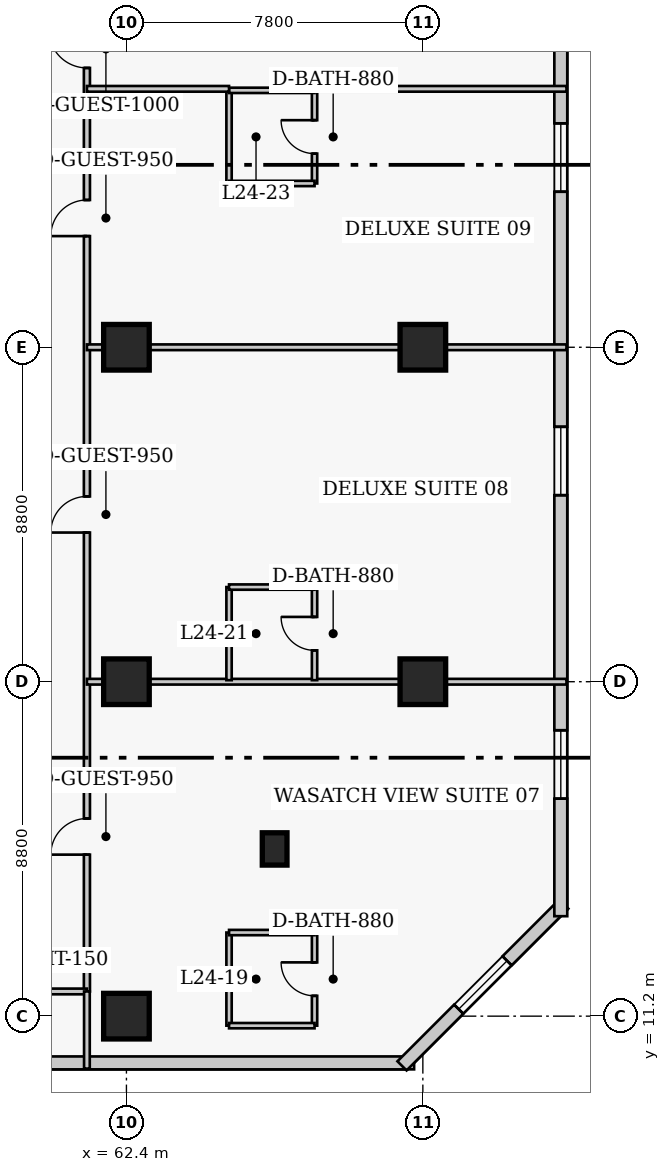
"""IFC4 building model, lengths in metres.
Left out: names, types, materials, properties, quantities, classifications, styles, units other than length and angle.
Written with IfcOpenShell. Run it as: python <this file> out.ifc"""

import sys

from ifc_helpers import new_model, si_unit, direction, frame, frame_2d, origin, origin_2d, place, context, subcontext, project, spatial, rectangle, extrude, element, fill, save


model = new_model("IFC4")
c1 = context("Model", 3, precision=1e-05, world=origin(), true_north=direction((0.0, 1.0)))
c2 = subcontext(c1, "Body", "Model", "MODEL_VIEW")
j1 = project(units=[si_unit("LENGTHUNIT", "METRE"), si_unit("PLANEANGLEUNIT", "RADIAN")], contexts=[c1])
p1 = place(None, origin())
s1 = spatial("IfcSite", under=j1, at=p1, CompositionType="ELEMENT")
p2 = place(p1, origin())
s2 = spatial("IfcBuilding", under=s1, at=p2, CompositionType="ELEMENT")
p3 = place(p2, frame((0.0, 0.0, 99.4)))
s3 = spatial("IfcBuildingStorey", under=s2, at=p3, CompositionType="ELEMENT", Elevation=99.4)
for number, where, z_axis, x_axis in (
    (1, (62.4, 11.2, 0.0), (0.0, 0.0, 1.0), (1.0, 0.0, 0.0)),
    (2, (62.4, 20.0, 0.0), (0.0, 0.0, 1.0), (1.0, 0.0, 0.0)),
    (3, (62.4, 28.8, 0.0), (0.0, 0.0, 1.0), (1.0, 0.0, 0.0)),
    (4, (70.2, 20.0, 0.0), (0.0, 0.0, 1.0), (1.0, 0.0, 0.0)),
    (5, (70.2, 28.8, 0.0), (0.0, 0.0, 1.0), (1.0, 0.0, 0.0)),
):
    element("IfcColumn", number, at=place(p3, frame(where, z_axis=z_axis, x_axis=x_axis)), inside=s3, PredefinedType="COLUMN", context=c2, shape_type="SweptSolid", body=[
        extrude(rectangle(XDim=1.2, YDim=1.2, at=origin_2d()), origin(), (0.0, 0.0, 1.0), 3.8),
    ])
p4 = place(p3, frame((66.3, 15.6, 0.0), z_axis=(0.0, 0.0, 1.0), x_axis=(1.0, 0.0, 0.0)))
e6 = element("IfcColumn", 6, at=p4, inside=s3, PredefinedType="PILASTER", context=c2, shape_type="SweptSolid", body=[
    extrude(rectangle(XDim=0.65, YDim=0.85, at=origin_2d()), origin(), (0.0, 0.0, 1.0), 3.8),
])
p5 = place(p3, frame((41.68, 9.97, 0.0), z_axis=(0.0, 0.0, 1.0), x_axis=(1.0, 0.0, 0.0)))
e7 = element("IfcWall", 7, at=p5, inside=s3, PredefinedType="SOLIDWALL", context=c2, shape_type="SweptSolid", body=[
    extrude(rectangle(XDim=28.29, YDim=0.34, at=frame_2d((14.145, 0.0))), origin(), (0.0, 0.0, 1.0), 3.54),
])
p6 = place(p5, frame((2.665, 0.0, 0.85)))
e8 = element("IfcOpeningElement", 8, at=p6, cuts=e7, PredefinedType="OPENING", context=c2, shape_type="SweptSolid", body=[
    extrude(rectangle(XDim=1.8, YDim=1.8, at=frame_2d((0.9, 0.9))), frame((0.0, 0.18, 0.0), z_axis=(0.0, -1.0, 0.0), x_axis=(1.0, 0.0, 0.0)), (0.0, 0.0, 1.0), 0.36),
])
p7 = place(p5, frame((13.895, 0.0, 0.85)))
e9 = element("IfcOpeningElement", 9, at=p7, cuts=e7, PredefinedType="OPENING", context=c2, shape_type="SweptSolid", body=[
    extrude(rectangle(XDim=1.8, YDim=1.8, at=frame_2d((0.9, 0.9))), frame((0.0, 0.18, 0.0), z_axis=(0.0, -1.0, 0.0), x_axis=(1.0, 0.0, 0.0)), (0.0, 0.0, 1.0), 0.36),
])
p8 = place(p3, frame((69.652, 9.892, 0.0), z_axis=(0.0, 0.0, 1.0), x_axis=(0.707106781187, 0.707106781187, 0.0)))
e10 = element("IfcWall", 10, at=p8, inside=s3, PredefinedType="SOLIDWALL", context=c2, shape_type="SweptSolid", body=[
    extrude(rectangle(XDim=6.02, YDim=0.34, at=frame_2d((3.01, 0.0))), origin(), (0.0, 0.0, 1.0), 3.54),
])
p9 = place(p8, frame((2.11, 0.0, 0.85)))
e11 = element("IfcOpeningElement", 11, at=p9, cuts=e10, PredefinedType="OPENING", context=c2, shape_type="SweptSolid", body=[
    extrude(rectangle(XDim=1.8, YDim=1.8, at=frame_2d((0.9, 0.9))), frame((0.0, 0.18, 0.0), z_axis=(0.0, -1.0, 0.0), x_axis=(1.0, 0.0, 0.0)), (0.0, 0.0, 1.0), 0.36),
])
p10 = place(p3, frame((73.83, 13.83, 0.0), z_axis=(0.0, 0.0, 1.0), x_axis=(0.0, 1.0, 0.0)))
e12 = element("IfcWall", 12, at=p10, inside=s3, PredefinedType="SOLIDWALL", context=c2, shape_type="SweptSolid", body=[
    extrude(rectangle(XDim=31.94, YDim=0.34, at=frame_2d((15.97, 0.0))), origin(), (0.0, 0.0, 1.0), 3.54),
])
p11 = place(p10, frame((3.093, 0.0, 0.85)))
e13 = element("IfcOpeningElement", 13, at=p11, cuts=e12, PredefinedType="OPENING", context=c2, shape_type="SweptSolid", body=[
    extrude(rectangle(XDim=1.8, YDim=1.8, at=frame_2d((0.9, 0.9))), frame((0.0, 0.18, 0.0), z_axis=(0.0, -1.0, 0.0), x_axis=(1.0, 0.0, 0.0)), (0.0, 0.0, 1.0), 0.36),
])
p12 = place(p10, frame((11.077, 0.0, 0.85)))
e14 = element("IfcOpeningElement", 14, at=p12, cuts=e12, PredefinedType="OPENING", context=c2, shape_type="SweptSolid", body=[
    extrude(rectangle(XDim=1.8, YDim=1.8, at=frame_2d((0.9, 0.9))), frame((0.0, 0.18, 0.0), z_axis=(0.0, -1.0, 0.0), x_axis=(1.0, 0.0, 0.0)), (0.0, 0.0, 1.0), 0.36),
])
p13 = place(p10, frame((19.062, 0.0, 0.85)))
e15 = element("IfcOpeningElement", 15, at=p13, cuts=e12, PredefinedType="OPENING", context=c2, shape_type="SweptSolid", body=[
    extrude(rectangle(XDim=1.8, YDim=1.8, at=frame_2d((0.9, 0.9))), frame((0.0, 0.18, 0.0), z_axis=(0.0, -1.0, 0.0), x_axis=(1.0, 0.0, 0.0)), (0.0, 0.0, 1.0), 0.36),
])
p14 = place(p10, frame((27.048, 0.0, 0.85)))
e16 = element("IfcOpeningElement", 16, at=p14, cuts=e12, PredefinedType="OPENING", context=c2, shape_type="SweptSolid", body=[
    extrude(rectangle(XDim=1.8, YDim=1.8, at=frame_2d((0.9, 0.9))), frame((0.0, 0.18, 0.0), z_axis=(0.0, -1.0, 0.0), x_axis=(1.0, 0.0, 0.0)), (0.0, 0.0, 1.0), 0.36),
])
p15 = place(p3, frame((61.36, 11.85, 0.0), z_axis=(0.0, 0.0, 1.0), x_axis=(0.0, 1.0, 0.0)))
e17 = element("IfcWall", 17, at=p15, inside=s3, PredefinedType="PARTITIONING", context=c2, shape_type="SweptSolid", body=[
    extrude(rectangle(XDim=28.8, YDim=0.16, at=frame_2d((14.4, 0.0))), origin(), (0.0, 0.0, 1.0), 3.54),
])
p16 = place(p15, frame((3.6, 0.0, 0.0)))
e18 = element("IfcOpeningElement", 18, at=p16, cuts=e17, PredefinedType="OPENING", context=c2, shape_type="SweptSolid", body=[
    extrude(rectangle(XDim=0.95, YDim=2.1, at=frame_2d((0.475, 1.05))), frame((0.0, 0.09, 0.0), z_axis=(0.0, -1.0, 0.0), x_axis=(1.0, 0.0, 0.0)), (0.0, 0.0, 1.0), 0.18),
])
p17 = place(p15, frame((12.075, 0.0, 0.0)))
e19 = element("IfcOpeningElement", 19, at=p17, cuts=e17, PredefinedType="OPENING", context=c2, shape_type="SweptSolid", body=[
    extrude(rectangle(XDim=0.95, YDim=2.1, at=frame_2d((0.475, 1.05))), frame((0.0, 0.09, 0.0), z_axis=(0.0, -1.0, 0.0), x_axis=(1.0, 0.0, 0.0)), (0.0, 0.0, 1.0), 0.18),
])
p18 = place(p15, frame((19.875, 0.0, 0.0)))
e20 = element("IfcOpeningElement", 20, at=p18, cuts=e17, PredefinedType="OPENING", context=c2, shape_type="SweptSolid", body=[
    extrude(rectangle(XDim=0.95, YDim=2.1, at=frame_2d((0.475, 1.05))), frame((0.0, 0.09, 0.0), z_axis=(0.0, -1.0, 0.0), x_axis=(1.0, 0.0, 0.0)), (0.0, 0.0, 1.0), 0.18),
])
p19 = place(p15, frame((24.3, 0.0, 0.0)))
e21 = element("IfcOpeningElement", 21, at=p19, cuts=e17, PredefinedType="OPENING", context=c2, shape_type="SweptSolid", body=[
    extrude(rectangle(XDim=1.0, YDim=2.15, at=frame_2d((0.5, 1.075))), frame((0.0, 0.09, 0.0), z_axis=(0.0, -1.0, 0.0), x_axis=(1.0, 0.0, 0.0)), (0.0, 0.0, 1.0), 0.18),
])
p20 = place(p3, frame((59.14, 11.85, 0.0), z_axis=(0.0, 0.0, 1.0), x_axis=(1.0, 0.0, 0.0)))
e22 = element("IfcWall", 22, at=p20, inside=s3, PredefinedType="PARTITIONING", context=c2, shape_type="SweptSolid", body=[
    extrude(rectangle(XDim=2.22, YDim=0.15, at=frame_2d((1.11, 0.0))), origin(), (0.0, 0.0, 1.0), 3.54),
])
p21 = place(p3, frame((61.36, 9.82, 0.0), z_axis=(0.0, 0.0, 1.0), x_axis=(0.0, 1.0, 0.0)))
e23 = element("IfcWall", 23, at=p21, inside=s3, PredefinedType="PARTITIONING", context=c2, shape_type="SweptSolid", body=[
    extrude(rectangle(XDim=2.03, YDim=0.15, at=frame_2d((1.015, 0.0))), origin(), (0.0, 0.0, 1.0), 3.54),
])
p22 = place(p3, frame((65.1, 10.95, 0.0), z_axis=(0.0, 0.0, 1.0), x_axis=(0.0, 1.0, 0.0)))
e24 = element("IfcWall", 24, at=p22, inside=s3, PredefinedType="PLUMBINGWALL", context=c2, shape_type="SweptSolid", body=[
    extrude(rectangle(XDim=2.45, YDim=0.14, at=frame_2d((1.225, 0.0))), origin(), (0.0, 0.0, 1.0), 3.54),
])
p23 = place(p3, frame((67.35, 10.95, 0.0), z_axis=(0.0, 0.0, 1.0), x_axis=(0.0, 1.0, 0.0)))
e25 = element("IfcWall", 25, at=p23, inside=s3, PredefinedType="PLUMBINGWALL", context=c2, shape_type="SweptSolid", body=[
    extrude(rectangle(XDim=2.45, YDim=0.14, at=frame_2d((1.225, 0.0))), origin(), (0.0, 0.0, 1.0), 3.54),
])
p24 = place(p23, frame((0.785, 0.0, 0.0)))
e26 = element("IfcOpeningElement", 26, at=p24, cuts=e25, PredefinedType="OPENING", context=c2, shape_type="SweptSolid", body=[
    extrude(rectangle(XDim=0.88, YDim=2.05, at=frame_2d((0.44, 1.025))), frame((0.0, 0.08, 0.0), z_axis=(0.0, -1.0, 0.0), x_axis=(1.0, 0.0, 0.0)), (0.0, 0.0, 1.0), 0.16),
])
for number, where, z_axis, x_axis in (
    (27, (65.1, 10.95, 0.0), (0.0, 0.0, 1.0), (1.0, 0.0, 0.0)),
    (28, (65.1, 13.4, 0.0), (0.0, 0.0, 1.0), (1.0, 0.0, 0.0)),
):
    element("IfcWall", number, at=place(p3, frame(where, z_axis=z_axis, x_axis=x_axis)), inside=s3, PredefinedType="PLUMBINGWALL", context=c2, shape_type="SweptSolid", body=[
        extrude(rectangle(XDim=2.25, YDim=0.14, at=frame_2d((1.125, 0.0))), origin(), (0.0, 0.0, 1.0), 3.54),
    ])
p25 = place(p3, frame((61.36, 20.0, 0.0), z_axis=(0.0, 0.0, 1.0), x_axis=(1.0, 0.0, 0.0)))
e29 = element("IfcWall", 29, at=p25, inside=s3, PredefinedType="PARTITIONING", context=c2, shape_type="SweptSolid", body=[
    extrude(rectangle(XDim=12.62, YDim=0.15, at=frame_2d((6.31, 0.0))), origin(), (0.0, 0.0, 1.0), 2.679),
])
p26 = place(p3, frame((65.1, 20.04, 0.0), z_axis=(0.0, 0.0, 1.0), x_axis=(0.0, 1.0, 0.0)))
e30 = element("IfcWall", 30, at=p26, inside=s3, PredefinedType="PLUMBINGWALL", context=c2, shape_type="SweptSolid", body=[
    extrude(rectangle(XDim=2.45, YDim=0.14, at=frame_2d((1.225, 0.0))), origin(), (0.0, 0.0, 1.0), 3.54),
])
p27 = place(p3, frame((67.35, 20.04, 0.0), z_axis=(0.0, 0.0, 1.0), x_axis=(0.0, 1.0, 0.0)))
e31 = element("IfcWall", 31, at=p27, inside=s3, PredefinedType="PLUMBINGWALL", context=c2, shape_type="SweptSolid", body=[
    extrude(rectangle(XDim=2.45, YDim=0.14, at=frame_2d((1.225, 0.0))), origin(), (0.0, 0.0, 1.0), 3.54),
])
p28 = place(p27, frame((0.785, 0.0, 0.0)))
e32 = element("IfcOpeningElement", 32, at=p28, cuts=e31, PredefinedType="OPENING", context=c2, shape_type="SweptSolid", body=[
    extrude(rectangle(XDim=0.88, YDim=2.05, at=frame_2d((0.44, 1.025))), frame((0.0, 0.08, 0.0), z_axis=(0.0, -1.0, 0.0), x_axis=(1.0, 0.0, 0.0)), (0.0, 0.0, 1.0), 0.16),
])
p29 = place(p3, frame((65.1, 22.49, 0.0), z_axis=(0.0, 0.0, 1.0), x_axis=(1.0, 0.0, 0.0)))
e33 = element("IfcWall", 33, at=p29, inside=s3, PredefinedType="PLUMBINGWALL", context=c2, shape_type="SweptSolid", body=[
    extrude(rectangle(XDim=2.25, YDim=0.14, at=frame_2d((1.125, 0.0))), origin(), (0.0, 0.0, 1.0), 3.54),
])
p30 = place(p3, frame((61.36, 28.8, 0.0), z_axis=(0.0, 0.0, 1.0), x_axis=(1.0, 0.0, 0.0)))
e34 = element("IfcWall", 34, at=p30, inside=s3, PredefinedType="PARTITIONING", context=c2, shape_type="SweptSolid", body=[
    extrude(rectangle(XDim=12.62, YDim=0.15, at=frame_2d((6.31, 0.0))), origin(), (0.0, 0.0, 1.0), 2.679),
])
p31 = place(p3, frame((65.1, 33.11, 0.0), z_axis=(0.0, 0.0, 1.0), x_axis=(0.0, 1.0, 0.0)))
e35 = element("IfcWall", 35, at=p31, inside=s3, PredefinedType="PLUMBINGWALL", context=c2, shape_type="SweptSolid", body=[
    extrude(rectangle(XDim=2.45, YDim=0.14, at=frame_2d((1.225, 0.0))), origin(), (0.0, 0.0, 1.0), 3.54),
])
p32 = place(p3, frame((67.35, 33.11, 0.0), z_axis=(0.0, 0.0, 1.0), x_axis=(0.0, 1.0, 0.0)))
e36 = element("IfcWall", 36, at=p32, inside=s3, PredefinedType="PLUMBINGWALL", context=c2, shape_type="SweptSolid", body=[
    extrude(rectangle(XDim=2.45, YDim=0.14, at=frame_2d((1.225, 0.0))), origin(), (0.0, 0.0, 1.0), 3.54),
])
p33 = place(p32, frame((0.785, 0.0, 0.0)))
e37 = element("IfcOpeningElement", 37, at=p33, cuts=e36, PredefinedType="OPENING", context=c2, shape_type="SweptSolid", body=[
    extrude(rectangle(XDim=0.88, YDim=2.05, at=frame_2d((0.44, 1.025))), frame((0.0, 0.08, 0.0), z_axis=(0.0, -1.0, 0.0), x_axis=(1.0, 0.0, 0.0)), (0.0, 0.0, 1.0), 0.16),
])
for number, where, z_axis, x_axis in (
    (38, (65.1, 33.11, 0.0), (0.0, 0.0, 1.0), (1.0, 0.0, 0.0)),
    (39, (65.1, 35.56, 0.0), (0.0, 0.0, 1.0), (1.0, 0.0, 0.0)),
):
    element("IfcWall", number, at=place(p3, frame(where, z_axis=z_axis, x_axis=x_axis)), inside=s3, PredefinedType="PLUMBINGWALL", context=c2, shape_type="SweptSolid", body=[
        extrude(rectangle(XDim=2.25, YDim=0.14, at=frame_2d((1.125, 0.0))), origin(), (0.0, 0.0, 1.0), 3.54),
    ])
p34 = place(p3, frame((61.36, 35.6, 0.0), z_axis=(0.0, 0.0, 1.0), x_axis=(1.0, 0.0, 0.0)))
e40 = element("IfcWall", 40, at=p34, inside=s3, PredefinedType="PARTITIONING", context=c2, shape_type="SweptSolid", body=[
    extrude(rectangle(XDim=3.74, YDim=0.15, at=frame_2d((1.87, 0.0))), origin(), (0.0, 0.0, 1.0), 3.54),
])
p35 = place(p3, frame((67.35, 35.6, 0.0), z_axis=(0.0, 0.0, 1.0), x_axis=(1.0, 0.0, 0.0)))
e41 = element("IfcWall", 41, at=p35, inside=s3, PredefinedType="PARTITIONING", context=c2, shape_type="SweptSolid", body=[
    extrude(rectangle(XDim=6.63, YDim=0.15, at=frame_2d((3.315, 0.0))), origin(), (0.0, 0.0, 1.0), 3.54),
])
p36 = place(p9, origin())
e42 = element("IfcWindow", 42, at=p36, inside=s3, PartitioningType="SINGLE_PANEL", PredefinedType="WINDOW", context=c2, shape_type="SweptSolid", body=[
    extrude(rectangle(XDim=1.8, YDim=1.8, at=frame_2d((0.9, 0.9))), frame((0.0, 0.03, 0.0), z_axis=(0.0, -1.0, 0.0), x_axis=(1.0, 0.0, 0.0)), (0.0, 0.0, 1.0), 0.06),
])
fill(e11, e42)
p37 = place(p11, origin())
e43 = element("IfcWindow", 43, at=p37, inside=s3, PartitioningType="SINGLE_PANEL", PredefinedType="WINDOW", context=c2, shape_type="SweptSolid", body=[
    extrude(rectangle(XDim=1.8, YDim=1.8, at=frame_2d((0.9, 0.9))), frame((0.0, 0.03, 0.0), z_axis=(0.0, -1.0, 0.0), x_axis=(1.0, 0.0, 0.0)), (0.0, 0.0, 1.0), 0.06),
])
fill(e13, e43)
p38 = place(p12, origin())
e44 = element("IfcWindow", 44, at=p38, inside=s3, PartitioningType="SINGLE_PANEL", PredefinedType="WINDOW", context=c2, shape_type="SweptSolid", body=[
    extrude(rectangle(XDim=1.8, YDim=1.8, at=frame_2d((0.9, 0.9))), frame((0.0, 0.03, 0.0), z_axis=(0.0, -1.0, 0.0), x_axis=(1.0, 0.0, 0.0)), (0.0, 0.0, 1.0), 0.06),
])
fill(e14, e44)
p39 = place(p13, origin())
e45 = element("IfcWindow", 45, at=p39, inside=s3, PartitioningType="SINGLE_PANEL", PredefinedType="WINDOW", context=c2, shape_type="SweptSolid", body=[
    extrude(rectangle(XDim=1.8, YDim=1.8, at=frame_2d((0.9, 0.9))), frame((0.0, 0.03, 0.0), z_axis=(0.0, -1.0, 0.0), x_axis=(1.0, 0.0, 0.0)), (0.0, 0.0, 1.0), 0.06),
])
fill(e15, e45)
p40 = place(p24, origin())
e46 = element("IfcDoor", 46, at=p40, inside=s3, OperationType="SINGLE_SWING_RIGHT", PredefinedType="DOOR", context=c2, shape_type="SweptSolid", body=[
    extrude(rectangle(XDim=0.88, YDim=2.05, at=frame_2d((0.44, 1.025))), frame((0.0, 0.025, 0.0), z_axis=(0.0, -1.0, 0.0), x_axis=(1.0, 0.0, 0.0)), (0.0, 0.0, 1.0), 0.05),
])
fill(e26, e46)
p41 = place(p16, origin())
e47 = element("IfcDoor", 47, at=p41, inside=s3, OperationType="SINGLE_SWING_LEFT", PredefinedType="DOOR", context=c2, shape_type="SweptSolid", body=[
    extrude(rectangle(XDim=0.95, YDim=2.1, at=frame_2d((0.475, 1.05))), frame((0.0, 0.025, 0.0), z_axis=(0.0, -1.0, 0.0), x_axis=(1.0, 0.0, 0.0)), (0.0, 0.0, 1.0), 0.05),
])
fill(e18, e47)
p42 = place(p28, origin())
e48 = element("IfcDoor", 48, at=p42, inside=s3, OperationType="SINGLE_SWING_RIGHT", PredefinedType="DOOR", context=c2, shape_type="SweptSolid", body=[
    extrude(rectangle(XDim=0.88, YDim=2.05, at=frame_2d((0.44, 1.025))), frame((0.0, 0.025, 0.0), z_axis=(0.0, -1.0, 0.0), x_axis=(1.0, 0.0, 0.0)), (0.0, 0.0, 1.0), 0.05),
])
fill(e32, e48)
p43 = place(p17, origin())
e49 = element("IfcDoor", 49, at=p43, inside=s3, OperationType="SINGLE_SWING_LEFT", PredefinedType="DOOR", context=c2, shape_type="SweptSolid", body=[
    extrude(rectangle(XDim=0.95, YDim=2.1, at=frame_2d((0.475, 1.05))), frame((0.0, 0.025, 0.0), z_axis=(0.0, -1.0, 0.0), x_axis=(1.0, 0.0, 0.0)), (0.0, 0.0, 1.0), 0.05),
])
fill(e19, e49)
p44 = place(p33, origin())
e50 = element("IfcDoor", 50, at=p44, inside=s3, OperationType="SINGLE_SWING_RIGHT", PredefinedType="DOOR", context=c2, shape_type="SweptSolid", body=[
    extrude(rectangle(XDim=0.88, YDim=2.05, at=frame_2d((0.44, 1.025))), frame((0.0, 0.025, 0.0), z_axis=(0.0, -1.0, 0.0), x_axis=(1.0, 0.0, 0.0)), (0.0, 0.0, 1.0), 0.05),
])
fill(e37, e50)
p45 = place(p18, origin())
e51 = element("IfcDoor", 51, at=p45, inside=s3, OperationType="SINGLE_SWING_LEFT", PredefinedType="DOOR", context=c2, shape_type="SweptSolid", body=[
    extrude(rectangle(XDim=0.95, YDim=2.1, at=frame_2d((0.475, 1.05))), frame((0.0, 0.025, 0.0), z_axis=(0.0, -1.0, 0.0), x_axis=(1.0, 0.0, 0.0)), (0.0, 0.0, 1.0), 0.05),
])
fill(e20, e51)
p46 = place(p19, origin())
e52 = element("IfcDoor", 52, at=p46, inside=s3, OperationType="SINGLE_SWING_RIGHT", PredefinedType="DOOR", context=c2, shape_type="SweptSolid", body=[
    extrude(rectangle(XDim=1.0, YDim=2.15, at=frame_2d((0.5, 1.075))), frame((0.0, 0.025, 0.0), z_axis=(0.0, -1.0, 0.0), x_axis=(1.0, 0.0, 0.0)), (0.0, 0.0, 1.0), 0.05),
])
fill(e21, e52)
save(model, sys.argv[1])
